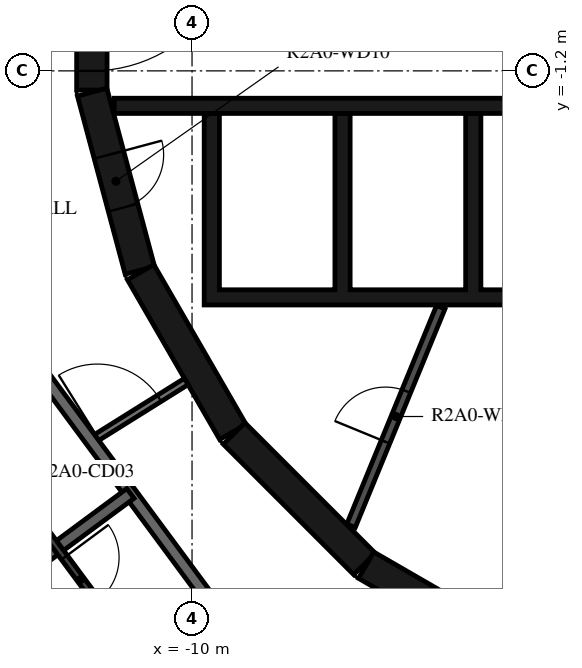
"""IFC4 building model, lengths in metres.
Left out: names, types, materials, properties, quantities, classifications, styles, units other than length and angle.
Written with IfcOpenShell. Run it as: python <this file> out.ifc"""

import sys

from ifc_helpers import new_model, si_unit, direction, frame, frame_2d, origin, place, context, subcontext, project, spatial, polyline, rectangle, outline, extrude, element, fill, save


model = new_model("IFC4")
c1 = context("Model", 3, precision=1e-05, world=origin(), true_north=direction((0.0, 1.0)))
c2 = subcontext(c1, "Body", "Model", "MODEL_VIEW")
j1 = project(units=[si_unit("LENGTHUNIT", "METRE"), si_unit("PLANEANGLEUNIT", "RADIAN")], contexts=[c1])
p1 = place(None, origin())
s1 = spatial("IfcSite", under=j1, at=p1, CompositionType="ELEMENT")
p2 = place(p1, origin())
s2 = spatial("IfcBuilding", under=s1, at=p2, CompositionType="ELEMENT")
p3 = place(p2, frame((0.0, 0.0, 83.7)))
s3 = spatial("IfcBuildingStorey", under=s2, at=p3, CompositionType="ELEMENT", Elevation=83.7)
p4 = place(p3, frame((-11.647, 1.516, 0.0), z_axis=(0.0, 0.0, 1.0), x_axis=(0.0, -1.0, 0.0)))
e1 = element("IfcWall", 1, at=p4, inside=s3, PredefinedType="SHEAR", context=c2, shape_type="SweptSolid", body=[
    extrude(rectangle(XDim=3.033, YDim=0.5, at=frame_2d((1.516, 0.0))), origin(), (0.0, 0.0, 1.0), 3.12),
])
p5 = place(p4, frame((0.316, 0.0, 0.0)))
e2 = element("IfcOpeningElement", 2, at=p5, cuts=e1, PredefinedType="OPENING", context=c2, shape_type="SweptSolid", body=[
    extrude(rectangle(XDim=2.4, YDim=2.1, at=frame_2d((1.2, 1.05))), frame((0.0, 0.26, 0.0), z_axis=(0.0, -1.0, 0.0), x_axis=(1.0, 0.0, 0.0)), (0.0, 0.0, 1.0), 0.52),
])
p6 = place(p3, frame((-11.643, -1.55, 0.0), z_axis=(0.0, 0.0, 1.0), x_axis=(0.258734743916, -0.965948410781, 0.0)))
e3 = element("IfcWall", 3, at=p6, inside=s3, PredefinedType="SHEAR", context=c2, shape_type="SweptSolid", body=[
    extrude(rectangle(XDim=3.033, YDim=0.5, at=frame_2d((1.516, 0.0))), origin(), (0.0, 0.0, 1.0), 3.12),
])
p7 = place(p6, frame((1.066, 0.0, 0.0)))
e4 = element("IfcOpeningElement", 4, at=p7, cuts=e3, PredefinedType="OPENING", context=c2, shape_type="SweptSolid", body=[
    extrude(rectangle(XDim=0.9, YDim=2.1, at=frame_2d((0.45, 1.05))), frame((0.0, 0.26, 0.0), z_axis=(0.0, -1.0, 0.0), x_axis=(1.0, 0.0, 0.0)), (0.0, 0.0, 1.0), 0.52),
])
p8 = place(p3, frame((-10.845, -4.51, 0.0), z_axis=(0.0, 0.0, 1.0), x_axis=(0.500087131594, -0.865975092491, 0.0)))
e5 = element("IfcWall", 5, at=p8, inside=s3, PredefinedType="SHEAR", context=c2, shape_type="SweptSolid", body=[
    extrude(rectangle(XDim=3.033, YDim=0.5, at=frame_2d((1.516, 0.0))), origin(), (0.0, 0.0, 1.0), 3.12),
])
p9 = place(p3, frame((-9.308, -7.164, 0.0), z_axis=(0.0, 0.0, 1.0), x_axis=(0.707106781187, -0.707106781187, 0.0)))
e6 = element("IfcWall", 6, at=p9, inside=s3, PredefinedType="SHEAR", context=c2, shape_type="SweptSolid", body=[
    extrude(rectangle(XDim=3.032, YDim=0.5, at=frame_2d((1.516, 0.0))), origin(), (0.0, 0.0, 1.0), 3.12),
])
p10 = place(p3, frame((-7.137, -9.329, 0.0), z_axis=(0.0, 0.0, 1.0), x_axis=(0.865975092491, -0.500087131594, 0.0)))
e7 = element("IfcWall", 7, at=p10, inside=s3, PredefinedType="SHEAR", context=c2, shape_type="SweptSolid", body=[
    extrude(rectangle(XDim=3.033, YDim=0.5, at=frame_2d((1.516, 0.0))), origin(), (0.0, 0.0, 1.0), 3.12),
])
p11 = place(p3, origin())
e8 = element("IfcWall", 8, at=p11, inside=s3, PredefinedType="SHEAR", context=c2, shape_type="SweptSolid", body=[
    extrude(outline(polyline([(9.8, -5.05), (9.8, -4.8), (9.8, -1.9), (9.55, -1.9), (9.55, -4.8), (7.65, -4.8), (7.65, -1.9), (7.4, -1.9), (7.4, -4.8), (5.5, -4.8), (5.5, -1.9), (5.25, -1.9), (5.25, -4.8), (3.35, -4.8), (3.35, -1.9), (3.1, -1.9), (3.1, -4.8), (1.2, -4.8), (1.2, -1.9), (0.95, -1.9), (0.95, -4.8), (-0.95, -4.8), (-0.95, -1.9), (-1.2, -1.9), (-1.2, -4.8), (-5.25, -4.8), (-5.25, -1.9), (-5.5, -1.9), (-5.5, -4.8), (-7.4, -4.8), (-7.4, -1.9), (-7.65, -1.9), (-7.65, -4.8), (-9.55, -4.8), (-9.55, -1.9), (-9.8, -1.9), (-9.8, -4.8), (-9.8, -5.05), (9.8, -5.05)])), origin(), (0.0, 0.0, 1.0), 3.12),
])
p12 = place(p3, frame((-11.28, -1.775, 0.0), z_axis=(0.0, 0.0, 1.0), x_axis=(1.0, 0.0, 0.0)))
e9 = element("IfcWall", 9, at=p12, inside=s3, PredefinedType="SHEAR", context=c2, shape_type="SweptSolid", body=[
    extrude(rectangle(XDim=14.38, YDim=0.25, at=frame_2d((7.19, 0.0))), origin(), (0.0, 0.0, 1.0), 3.12),
])
p13 = place(p12, frame((7.605, 0.0, 0.0)))
e10 = element("IfcOpeningElement", 10, at=p13, cuts=e9, PredefinedType="OPENING", context=c2, shape_type="SweptSolid", body=[
    extrude(rectangle(XDim=0.9, YDim=2.1, at=frame_2d((0.45, 1.05))), frame((0.0, 0.135, 0.0), z_axis=(0.0, -1.0, 0.0), x_axis=(1.0, 0.0, 0.0)), (0.0, 0.0, 1.0), 0.27),
])
p14 = place(p12, frame((10.83, 0.0, 0.0)))
e11 = element("IfcOpeningElement", 11, at=p14, cuts=e9, PredefinedType="OPENING", context=c2, shape_type="SweptSolid", body=[
    extrude(rectangle(XDim=0.9, YDim=2.1, at=frame_2d((0.45, 1.05))), frame((0.0, 0.135, 0.0), z_axis=(0.0, -1.0, 0.0), x_axis=(1.0, 0.0, 0.0)), (0.0, 0.0, 1.0), 0.27),
])
p15 = place(p12, frame((12.98, 0.0, 0.0)))
e12 = element("IfcOpeningElement", 12, at=p15, cuts=e9, PredefinedType="OPENING", context=c2, shape_type="SweptSolid", body=[
    extrude(rectangle(XDim=0.9, YDim=2.1, at=frame_2d((0.45, 1.05))), frame((0.0, 0.135, 0.0), z_axis=(0.0, -1.0, 0.0), x_axis=(1.0, 0.0, 0.0)), (0.0, 0.0, 1.0), 0.27),
])
p16 = place(p3, frame((-7.385, -8.681, 0.0), z_axis=(0.0, 0.0, 1.0), x_axis=(0.379804590409, 0.925066739811, 0.0)))
e13 = element("IfcWall", 13, at=p16, inside=s3, PredefinedType="PARTITIONING", context=c2, shape_type="SweptSolid", body=[
    extrude(rectangle(XDim=3.885, YDim=0.15, at=frame_2d((1.942, 0.0))), origin(), (0.0, 0.0, 1.0), 3.12),
])
p17 = place(p16, frame((1.493, 0.0, 0.0)))
e14 = element("IfcOpeningElement", 14, at=p17, cuts=e13, PredefinedType="OPENING", context=c2, shape_type="SweptSolid", body=[
    extrude(rectangle(XDim=0.9, YDim=2.1, at=frame_2d((0.45, 1.05))), frame((0.0, 0.085, 0.0), z_axis=(0.0, -1.0, 0.0), x_axis=(1.0, 0.0, 0.0)), (0.0, 0.0, 1.0), 0.17),
])
p18 = place(p3, frame((-11.654, -7.282, 0.0), z_axis=(0.0, 0.0, 1.0), x_axis=(0.848117698675, 0.529807860638, 0.0)))
e15 = element("IfcWall", 15, at=p18, inside=s3, PredefinedType="PARTITIONING", context=c2, shape_type="SweptSolid", body=[
    extrude(rectangle(XDim=1.838, YDim=0.12, at=frame_2d((0.919, 0.0))), origin(), (0.0, 0.0, 1.0), 3.12),
])
p19 = place(p18, frame((0.115, 0.0, 0.0)))
e16 = element("IfcOpeningElement", 16, at=p19, cuts=e15, PredefinedType="OPENING", context=c2, shape_type="SweptSolid", body=[
    extrude(rectangle(XDim=1.2, YDim=2.1, at=frame_2d((0.6, 1.05))), frame((0.0, 0.07, 0.0), z_axis=(0.0, -1.0, 0.0), x_axis=(1.0, 0.0, 0.0)), (0.0, 0.0, 1.0), 0.14),
])
p20 = place(p3, frame((-13.196, -5.198, 0.0), z_axis=(0.0, 0.0, 1.0), x_axis=(0.594805187394, -0.803869883159, 0.0)))
e17 = element("IfcWall", 17, at=p20, inside=s3, PredefinedType="STANDARD", context=c2, shape_type="SweptSolid", body=[
    extrude(rectangle(XDim=7.342, YDim=0.2, at=frame_2d((3.671, 0.0))), origin(), (0.0, 0.0, 1.0), 3.12),
])
p21 = place(p3, frame((-15.41, -11.403, 0.0), z_axis=(0.0, 0.0, 1.0), x_axis=(0.803887568227, 0.594781285558, 0.0)))
e18 = element("IfcWall", 18, at=p21, inside=s3, PredefinedType="STANDARD", context=c2, shape_type="SweptSolid", body=[
    extrude(rectangle(XDim=5.47, YDim=0.2, at=frame_2d((2.735, 0.0))), origin(), (0.0, 0.0, 1.0), 3.12),
])
p22 = place(p3, frame((-14.641, -5.767, 0.0), z_axis=(0.0, 0.0, 1.0), x_axis=(0.594825885962, -0.803854567313, 0.0)))
e19 = element("IfcWall", 19, at=p22, inside=s3, PredefinedType="PARTITIONING", context=c2, shape_type="SweptSolid", body=[
    extrude(rectangle(XDim=6.266, YDim=0.12, at=frame_2d((3.133, 0.0))), origin(), (0.0, 0.0, 1.0), 3.12),
])
p23 = place(p22, frame((4.273, 0.0, 0.0)))
e20 = element("IfcOpeningElement", 20, at=p23, cuts=e19, PredefinedType="OPENING", context=c2, shape_type="SweptSolid", body=[
    extrude(rectangle(XDim=0.9, YDim=2.1, at=frame_2d((0.45, 1.05))), frame((0.0, 0.07, 0.0), z_axis=(0.0, -1.0, 0.0), x_axis=(1.0, 0.0, 0.0)), (0.0, 0.0, 1.0), 0.14),
])
p24 = place(p5, origin())
e21 = element("IfcDoor", 21, at=p24, inside=s3, OperationType="DOUBLE_DOOR_SINGLE_SWING", PredefinedType="DOOR", context=c2, shape_type="SweptSolid", body=[
    extrude(rectangle(XDim=2.4, YDim=2.1, at=frame_2d((1.2, 1.05))), frame((0.0, 0.025, 0.0), z_axis=(0.0, -1.0, 0.0), x_axis=(1.0, 0.0, 0.0)), (0.0, 0.0, 1.0), 0.05),
])
fill(e2, e21)
p25 = place(p17, origin())
e22 = element("IfcDoor", 22, at=p25, inside=s3, OperationType="SINGLE_SWING_LEFT", PredefinedType="DOOR", context=c2, shape_type="SweptSolid", body=[
    extrude(rectangle(XDim=0.9, YDim=2.1, at=frame_2d((0.45, 1.05))), frame((0.0, 0.025, 0.0), z_axis=(0.0, -1.0, 0.0), x_axis=(1.0, 0.0, 0.0)), (0.0, 0.0, 1.0), 0.05),
])
fill(e14, e22)
p26 = place(p7, origin())
e23 = element("IfcDoor", 23, at=p26, inside=s3, OperationType="SINGLE_SWING_LEFT", PredefinedType="DOOR", context=c2, shape_type="SweptSolid", body=[
    extrude(rectangle(XDim=0.9, YDim=2.1, at=frame_2d((0.45, 1.05))), frame((0.0, 0.025, 0.0), z_axis=(0.0, -1.0, 0.0), x_axis=(1.0, 0.0, 0.0)), (0.0, 0.0, 1.0), 0.05),
])
fill(e4, e23)
p27 = place(p23, origin())
e24 = element("IfcDoor", 24, at=p27, inside=s3, OperationType="SINGLE_SWING_LEFT", PredefinedType="DOOR", context=c2, shape_type="SweptSolid", body=[
    extrude(rectangle(XDim=0.9, YDim=2.1, at=frame_2d((0.45, 1.05))), frame((0.0, 0.025, 0.0), z_axis=(0.0, -1.0, 0.0), x_axis=(1.0, 0.0, 0.0)), (0.0, 0.0, 1.0), 0.05),
])
fill(e20, e24)
p28 = place(p19, origin())
e25 = element("IfcDoor", 25, at=p28, inside=s3, OperationType="DOUBLE_DOOR_SINGLE_SWING", PredefinedType="DOOR", context=c2, shape_type="SweptSolid", body=[
    extrude(rectangle(XDim=1.2, YDim=2.1, at=frame_2d((0.6, 1.05))), frame((0.0, 0.025, 0.0), z_axis=(0.0, -1.0, 0.0), x_axis=(1.0, 0.0, 0.0)), (0.0, 0.0, 1.0), 0.05),
])
fill(e16, e25)
save(model, sys.argv[1])
